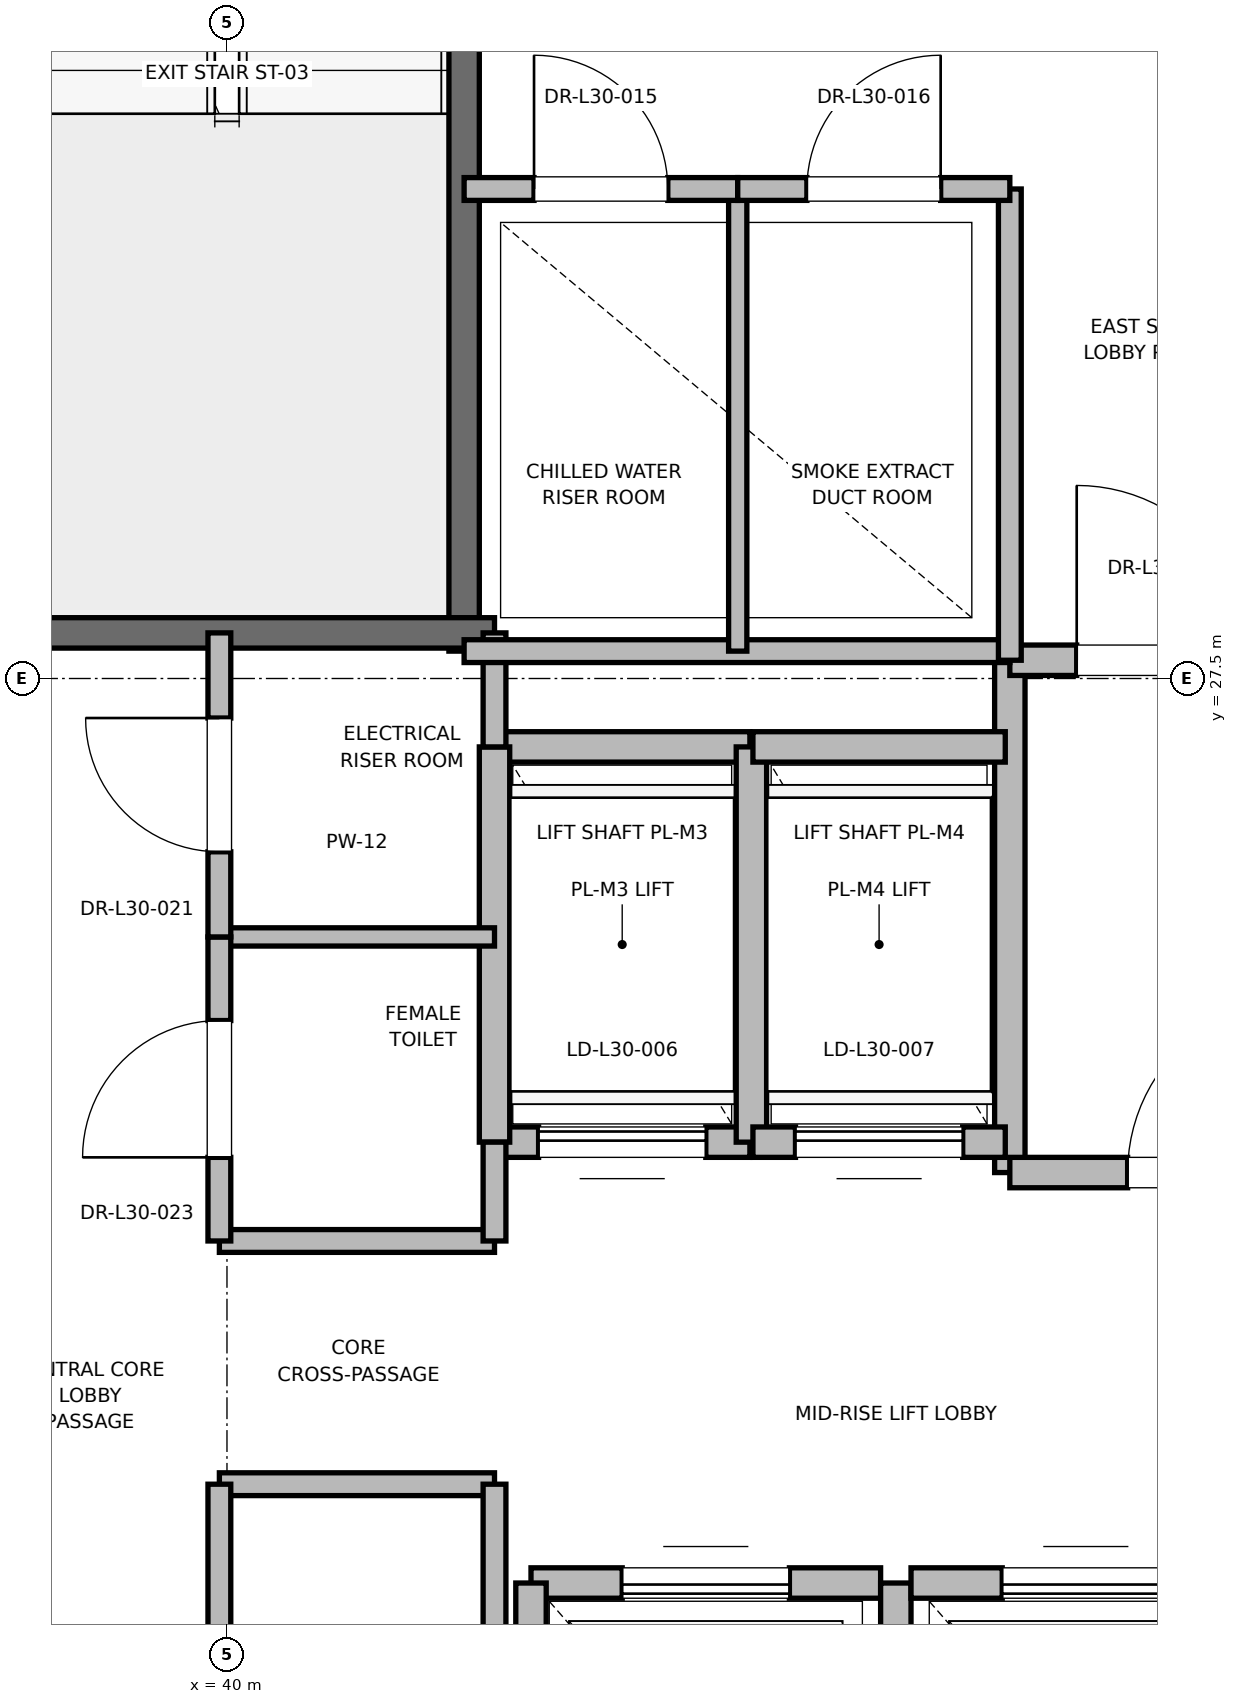
"""IFC4 building model, lengths in metres.
Left out: names, types, materials, properties, quantities, classifications, styles, units other than length and angle.
Written with IfcOpenShell. Run it as: python <this file> out.ifc"""

import sys

from ifc_helpers import new_model, si_unit, direction, frame, frame_2d, origin, place, context, subcontext, project, spatial, rectangle, extrude, element, fill, save


model = new_model("IFC4")
c1 = context("Model", 3, precision=1e-05, world=origin(), true_north=direction((0.0, 1.0)))
c2 = subcontext(c1, "Body", "Model", "MODEL_VIEW")
j1 = project(units=[si_unit("LENGTHUNIT", "METRE"), si_unit("PLANEANGLEUNIT", "RADIAN")], contexts=[c1])
p1 = place(None, origin())
s1 = spatial("IfcSite", under=j1, at=p1, CompositionType="ELEMENT")
p2 = place(p1, origin())
s2 = spatial("IfcBuilding", under=s1, at=p2, CompositionType="ELEMENT")
p3 = place(p2, frame((0.0, 0.0, 132.4)))
s3 = spatial("IfcBuildingStorey", under=s2, at=p3, CompositionType="ELEMENT", Elevation=132.4)
p4 = place(p3, frame((41.56, 27.68, 0.0), z_axis=(0.0, 0.0, 1.0), x_axis=(0.0, 1.0, 0.0)))
e1 = element("IfcWall", 1, at=p4, inside=s3, PredefinedType="SOLIDWALL", context=c2, shape_type="SweptSolid", body=[
    extrude(rectangle(XDim=8.57, YDim=0.2, at=frame_2d((4.285, 0.0))), origin(), (0.0, 0.0, 1.0), 3.775),
])
p5 = place(p3, frame((38.44, 27.8, 0.0), z_axis=(0.0, 0.0, 1.0), x_axis=(1.0, 0.0, 0.0)))
e2 = element("IfcWall", 2, at=p5, inside=s3, PredefinedType="SOLIDWALL", context=c2, shape_type="SweptSolid", body=[
    extrude(rectangle(XDim=3.32, YDim=0.2, at=frame_2d((1.66, 0.0))), origin(), (0.0, 0.0, 1.0), 3.775),
])
p6 = place(p3, frame((45.15, 24.25, 0.0), z_axis=(0.0, 0.0, 1.0), x_axis=(0.0, 1.0, 0.0)))
e3 = element("IfcWall", 3, at=p6, inside=s3, PredefinedType="PARTITIONING", context=c2, shape_type="SweptSolid", body=[
    extrude(rectangle(XDim=3.37, YDim=0.2, at=frame_2d((1.685, 0.0))), origin(), (0.0, 0.0, 1.0), 3.775),
])
p7 = place(p3, frame((45.15, 24.25, 0.0), z_axis=(0.0, 0.0, 1.0), x_axis=(1.0, 0.0, 0.0)))
e4 = element("IfcWall", 4, at=p7, inside=s3, PredefinedType="PARTITIONING", context=c2, shape_type="SweptSolid", body=[
    extrude(rectangle(XDim=2.7, YDim=0.2, at=frame_2d((1.35, 0.0))), origin(), (0.0, 0.0, 1.0), 3.775),
])
p8 = place(p7, frame((0.775, 0.0, 0.0)))
e5 = element("IfcOpeningElement", 5, at=p8, cuts=e4, PredefinedType="OPENING", context=c2, shape_type="SweptSolid", body=[
    extrude(rectangle(XDim=1.15, YDim=2.2, at=frame_2d((0.575, 1.1))), frame((0.0, 0.1, 0.0), z_axis=(0.0, -1.0, 0.0), x_axis=(1.0, 0.0, 0.0)), (0.0, 0.0, 1.0), 0.2),
])
p9 = place(p3, frame((45.15, 27.62, 0.0), z_axis=(0.0, 0.0, 1.0), x_axis=(1.0, 0.0, 0.0)))
e6 = element("IfcWall", 6, at=p9, inside=s3, PredefinedType="PARTITIONING", context=c2, shape_type="SweptSolid", body=[
    extrude(rectangle(XDim=2.03, YDim=0.2, at=frame_2d((1.015, 0.0))), origin(), (0.0, 0.0, 1.0), 3.775),
])
p10 = place(p9, frame((0.44, 0.0, 0.0)))
e7 = element("IfcOpeningElement", 7, at=p10, cuts=e6, PredefinedType="OPENING", context=c2, shape_type="SweptSolid", body=[
    extrude(rectangle(XDim=1.15, YDim=2.2, at=frame_2d((0.575, 1.1))), frame((0.0, 0.1, 0.0), z_axis=(0.0, -1.0, 0.0), x_axis=(1.0, 0.0, 0.0)), (0.0, 0.0, 1.0), 0.2),
])
p11 = place(p3, frame((44.3, 21.55, 0.0), z_axis=(0.0, 0.0, 1.0), x_axis=(-1.0, 0.0, 0.0)))
e8 = element("IfcWall", 8, at=p11, inside=s3, PredefinedType="SOLIDWALL", context=c2, shape_type="SweptSolid", body=[
    extrude(rectangle(XDim=2.3, YDim=0.2, at=frame_2d((1.15, 0.0))), origin(), (0.0, 0.0, 1.0), 3.775),
])
p12 = place(p11, frame((0.6, 0.0, 0.0)))
e9 = element("IfcOpeningElement", 9, at=p12, cuts=e8, PredefinedType="OPENING", context=c2, shape_type="SweptSolid", body=[
    extrude(rectangle(XDim=1.1, YDim=2.2, at=frame_2d((0.55, 1.1))), frame((0.0, 0.1, 0.0), z_axis=(0.0, -1.0, 0.0), x_axis=(1.0, 0.0, 0.0)), (0.0, 0.0, 1.0), 0.2),
])
p13 = place(p3, frame((42.0, 21.55, 0.0), z_axis=(0.0, 0.0, 1.0), x_axis=(0.0, -1.0, 0.0)))
e10 = element("IfcWall", 10, at=p13, inside=s3, PredefinedType="SOLIDWALL", context=c2, shape_type="SweptSolid", body=[
    extrude(rectangle(XDim=2.6, YDim=0.2, at=frame_2d((1.3, 0.0))), origin(), (0.0, 0.0, 1.0), 2.755),
])
p14 = place(p3, frame((44.4, 18.95, 0.0), z_axis=(0.0, 0.0, 1.0), x_axis=(0.0, 1.0, 0.0)))
e11 = element("IfcWall", 11, at=p14, inside=s3, PredefinedType="SOLIDWALL", context=c2, shape_type="SweptSolid", body=[
    extrude(rectangle(XDim=2.6, YDim=0.2, at=frame_2d((1.3, 0.0))), origin(), (0.0, 0.0, 1.0), 3.775),
])
p15 = place(p3, frame((46.8, 21.55, 0.0), z_axis=(0.0, 0.0, 1.0), x_axis=(-1.0, 0.0, 0.0)))
e12 = element("IfcWall", 12, at=p15, inside=s3, PredefinedType="SOLIDWALL", context=c2, shape_type="SweptSolid", body=[
    extrude(rectangle(XDim=2.3, YDim=0.2, at=frame_2d((1.15, 0.0))), origin(), (0.0, 0.0, 1.0), 3.775),
])
p16 = place(p15, frame((0.6, 0.0, 0.0)))
e13 = element("IfcOpeningElement", 13, at=p16, cuts=e12, PredefinedType="OPENING", context=c2, shape_type="SweptSolid", body=[
    extrude(rectangle(XDim=1.1, YDim=2.2, at=frame_2d((0.55, 1.1))), frame((0.0, 0.1, 0.0), z_axis=(0.0, -1.0, 0.0), x_axis=(1.0, 0.0, 0.0)), (0.0, 0.0, 1.0), 0.2),
])
p17 = place(p3, frame((41.76, 24.45, 0.0), z_axis=(0.0, 0.0, 1.0), x_axis=(1.0, 0.0, 0.0)))
e14 = element("IfcWall", 14, at=p17, inside=s3, PredefinedType="SOLIDWALL", context=c2, shape_type="SweptSolid", body=[
    extrude(rectangle(XDim=1.68, YDim=0.2, at=frame_2d((0.84, 0.0))), origin(), (0.0, 0.0, 1.0), 3.775),
])
p18 = place(p17, frame((0.29, 0.0, 0.0)))
e15 = element("IfcOpeningElement", 15, at=p18, cuts=e14, PredefinedType="OPENING", context=c2, shape_type="SweptSolid", body=[
    extrude(rectangle(XDim=1.1, YDim=2.2, at=frame_2d((0.55, 1.1))), frame((0.0, 0.1, 0.0), z_axis=(0.0, -1.0, 0.0), x_axis=(1.0, 0.0, 0.0)), (0.0, 0.0, 1.0), 0.2),
])
p19 = place(p3, frame((43.44, 27.05, 0.0), z_axis=(0.0, 0.0, 1.0), x_axis=(-1.0, 0.0, 0.0)))
e16 = element("IfcWall", 16, at=p19, inside=s3, PredefinedType="SOLIDWALL", context=c2, shape_type="SweptSolid", body=[
    extrude(rectangle(XDim=1.68, YDim=0.2, at=frame_2d((0.84, 0.0))), origin(), (0.0, 0.0, 1.0), 3.775),
])
for number, where, z_axis, x_axis in (
    (17, (41.76, 27.05, 0.0), (0.0, 0.0, 1.0), (0.0, -1.0, 0.0)),
    (18, (43.45, 24.45, 0.0), (0.0, 0.0, 1.0), (0.0, 1.0, 0.0)),
):
    element("IfcWall", number, at=place(p3, frame(where, z_axis=z_axis, x_axis=x_axis)), inside=s3, PredefinedType="SOLIDWALL", context=c2, shape_type="SweptSolid", body=[
        extrude(rectangle(XDim=2.6, YDim=0.2, at=frame_2d((1.3, 0.0))), origin(), (0.0, 0.0, 1.0), 3.775),
    ])
p20 = place(p3, frame((43.46, 24.45, 0.0), z_axis=(0.0, 0.0, 1.0), x_axis=(1.0, 0.0, 0.0)))
e19 = element("IfcWall", 19, at=p20, inside=s3, PredefinedType="SOLIDWALL", context=c2, shape_type="SweptSolid", body=[
    extrude(rectangle(XDim=1.66, YDim=0.2, at=frame_2d((0.83, 0.0))), origin(), (0.0, 0.0, 1.0), 3.775),
])
p21 = place(p20, frame((0.28, 0.0, 0.0)))
e20 = element("IfcOpeningElement", 20, at=p21, cuts=e19, PredefinedType="OPENING", context=c2, shape_type="SweptSolid", body=[
    extrude(rectangle(XDim=1.1, YDim=2.2, at=frame_2d((0.55, 1.1))), frame((0.0, 0.1, 0.0), z_axis=(0.0, -1.0, 0.0), x_axis=(1.0, 0.0, 0.0)), (0.0, 0.0, 1.0), 0.2),
])
p22 = place(p3, frame((45.12, 27.05, 0.0), z_axis=(0.0, 0.0, 1.0), x_axis=(-1.0, 0.0, 0.0)))
e21 = element("IfcWall", 21, at=p22, inside=s3, PredefinedType="SOLIDWALL", context=c2, shape_type="SweptSolid", body=[
    extrude(rectangle(XDim=1.66, YDim=0.2, at=frame_2d((0.83, 0.0))), origin(), (0.0, 0.0, 1.0), 3.775),
])
for number, where, z_axis, x_axis in (
    (22, (39.95, 22.2, 0.0), (0.0, 0.0, 1.0), (1.0, 0.0, 0.0)),
    (23, (39.95, 23.8, 0.0), (0.0, 0.0, 1.0), (1.0, 0.0, 0.0)),
):
    element("IfcWall", number, at=place(p3, frame(where, z_axis=z_axis, x_axis=x_axis)), inside=s3, PredefinedType="PARTITIONING", context=c2, shape_type="SweptSolid", body=[
        extrude(rectangle(XDim=1.81, YDim=0.15, at=frame_2d((0.905, 0.0))), origin(), (0.0, 0.0, 1.0), 2.85),
    ])
p23 = place(p3, frame((39.95, 25.8, 0.0), z_axis=(0.0, 0.0, 1.0), x_axis=(1.0, 0.0, 0.0)))
e24 = element("IfcWall", 24, at=p23, inside=s3, PredefinedType="PARTITIONING", context=c2, shape_type="SweptSolid", body=[
    extrude(rectangle(XDim=1.81, YDim=0.12, at=frame_2d((0.905, 0.0))), origin(), (0.0, 0.0, 1.0), 2.85),
])
p24 = place(p3, frame((41.76, 18.6, 0.0), z_axis=(0.0, 0.0, 1.0), x_axis=(0.0, 1.0, 0.0)))
e25 = element("IfcWall", 25, at=p24, inside=s3, PredefinedType="PARTITIONING", context=c2, shape_type="SweptSolid", body=[
    extrude(rectangle(XDim=3.6, YDim=0.15, at=frame_2d((1.8, 0.0))), origin(), (0.0, 0.0, 1.0), 2.755),
])
p25 = place(p3, frame((41.76, 23.8, 0.0), z_axis=(0.0, 0.0, 1.0), x_axis=(0.0, 1.0, 0.0)))
e26 = element("IfcWall", 26, at=p25, inside=s3, PredefinedType="PARTITIONING", context=c2, shape_type="SweptSolid", body=[
    extrude(rectangle(XDim=0.65, YDim=0.15, at=frame_2d((0.325, 0.0))), origin(), (0.0, 0.0, 1.0), 2.85),
])
p26 = place(p3, frame((41.76, 27.05, 0.0), z_axis=(0.0, 0.0, 1.0), x_axis=(0.0, 1.0, 0.0)))
e27 = element("IfcWall", 27, at=p26, inside=s3, PredefinedType="PARTITIONING", context=c2, shape_type="SweptSolid", body=[
    extrude(rectangle(XDim=0.75, YDim=0.15, at=frame_2d((0.375, 0.0))), origin(), (0.0, 0.0, 1.0), 2.85),
])
p27 = place(p3, frame((39.95, 19.2, 0.0), z_axis=(0.0, 0.0, 1.0), x_axis=(0.0, 1.0, 0.0)))
e28 = element("IfcWall", 28, at=p27, inside=s3, PredefinedType="PARTITIONING", context=c2, shape_type="SweptSolid", body=[
    extrude(rectangle(XDim=3.0, YDim=0.15, at=frame_2d((1.5, 0.0))), origin(), (0.0, 0.0, 1.0), 2.85),
])
p28 = place(p27, frame((1.05, 0.0, 0.0)))
e29 = element("IfcOpeningElement", 29, at=p28, cuts=e28, PredefinedType="OPENING", context=c2, shape_type="SweptSolid", body=[
    extrude(rectangle(XDim=0.9, YDim=2.1, at=frame_2d((0.45, 1.05))), frame((0.0, 0.075, 0.0), z_axis=(0.0, -1.0, 0.0), x_axis=(1.0, 0.0, 0.0)), (0.0, 0.0, 1.0), 0.15),
])
p29 = place(p3, frame((39.95, 23.8, 0.0), z_axis=(0.0, 0.0, 1.0), x_axis=(0.0, 1.0, 0.0)))
e30 = element("IfcWall", 30, at=p29, inside=s3, PredefinedType="PARTITIONING", context=c2, shape_type="SweptSolid", body=[
    extrude(rectangle(XDim=2.0, YDim=0.15, at=frame_2d((1.0, 0.0))), origin(), (0.0, 0.0, 1.0), 2.85),
])
p30 = place(p29, frame((0.55, 0.0, 0.0)))
e31 = element("IfcOpeningElement", 31, at=p30, cuts=e30, PredefinedType="OPENING", context=c2, shape_type="SweptSolid", body=[
    extrude(rectangle(XDim=0.9, YDim=2.1, at=frame_2d((0.45, 1.05))), frame((0.0, 0.075, 0.0), z_axis=(0.0, -1.0, 0.0), x_axis=(1.0, 0.0, 0.0)), (0.0, 0.0, 1.0), 0.15),
])
p31 = place(p3, frame((39.95, 25.8, 0.0), z_axis=(0.0, 0.0, 1.0), x_axis=(0.0, 1.0, 0.0)))
e32 = element("IfcWall", 32, at=p31, inside=s3, PredefinedType="PARTITIONING", context=c2, shape_type="SweptSolid", body=[
    extrude(rectangle(XDim=2.0, YDim=0.15, at=frame_2d((1.0, 0.0))), origin(), (0.0, 0.0, 1.0), 2.85),
])
p32 = place(p31, frame((0.56, 0.0, 0.0)))
e33 = element("IfcOpeningElement", 33, at=p32, cuts=e32, PredefinedType="OPENING", context=c2, shape_type="SweptSolid", body=[
    extrude(rectangle(XDim=0.88, YDim=2.1, at=frame_2d((0.44, 1.05))), frame((0.0, 0.075, 0.0), z_axis=(0.0, -1.0, 0.0), x_axis=(1.0, 0.0, 0.0)), (0.0, 0.0, 1.0), 0.15),
])
p33 = place(p3, frame((41.56, 27.68, 0.0), z_axis=(0.0, 0.0, 1.0), x_axis=(1.0, 0.0, 0.0)))
e34 = element("IfcWall", 34, at=p33, inside=s3, PredefinedType="PARTITIONING", context=c2, shape_type="SweptSolid", body=[
    extrude(rectangle(XDim=3.59, YDim=0.15, at=frame_2d((1.795, 0.0))), origin(), (0.0, 0.0, 1.0), 2.85),
])
p34 = place(p3, frame((45.15, 27.62, 0.0), z_axis=(0.0, 0.0, 1.0), x_axis=(0.0, 1.0, 0.0)))
e35 = element("IfcWall", 35, at=p34, inside=s3, PredefinedType="PARTITIONING", context=c2, shape_type="SweptSolid", body=[
    extrude(rectangle(XDim=3.1, YDim=0.15, at=frame_2d((1.55, 0.0))), origin(), (0.0, 0.0, 1.0), 2.85),
])
p35 = place(p3, frame((43.36, 27.68, 0.0), z_axis=(0.0, 0.0, 1.0), x_axis=(0.0, 1.0, 0.0)))
e36 = element("IfcWall", 36, at=p35, inside=s3, PredefinedType="PARTITIONING", context=c2, shape_type="SweptSolid", body=[
    extrude(rectangle(XDim=3.04, YDim=0.12, at=frame_2d((1.52, 0.0))), origin(), (0.0, 0.0, 1.0), 2.85),
])
p36 = place(p3, frame((41.56, 30.72, 0.0), z_axis=(0.0, 0.0, 1.0), x_axis=(1.0, 0.0, 0.0)))
e37 = element("IfcWall", 37, at=p36, inside=s3, PredefinedType="PARTITIONING", context=c2, shape_type="SweptSolid", body=[
    extrude(rectangle(XDim=1.8, YDim=0.15, at=frame_2d((0.9, 0.0))), origin(), (0.0, 0.0, 1.0), 2.85),
])
p37 = place(p36, frame((0.46, 0.0, 0.0)))
e38 = element("IfcOpeningElement", 38, at=p37, cuts=e37, PredefinedType="OPENING", context=c2, shape_type="SweptSolid", body=[
    extrude(rectangle(XDim=0.88, YDim=2.1, at=frame_2d((0.44, 1.05))), frame((0.0, 0.075, 0.0), z_axis=(0.0, -1.0, 0.0), x_axis=(1.0, 0.0, 0.0)), (0.0, 0.0, 1.0), 0.15),
])
p38 = place(p3, frame((43.36, 30.72, 0.0), z_axis=(0.0, 0.0, 1.0), x_axis=(1.0, 0.0, 0.0)))
e39 = element("IfcWall", 39, at=p38, inside=s3, PredefinedType="PARTITIONING", context=c2, shape_type="SweptSolid", body=[
    extrude(rectangle(XDim=1.79, YDim=0.15, at=frame_2d((0.895, 0.0))), origin(), (0.0, 0.0, 1.0), 2.85),
])
p39 = place(p38, frame((0.455, 0.0, 0.0)))
e40 = element("IfcOpeningElement", 40, at=p39, cuts=e39, PredefinedType="OPENING", context=c2, shape_type="SweptSolid", body=[
    extrude(rectangle(XDim=0.88, YDim=2.1, at=frame_2d((0.44, 1.05))), frame((0.0, 0.075, 0.0), z_axis=(0.0, -1.0, 0.0), x_axis=(1.0, 0.0, 0.0)), (0.0, 0.0, 1.0), 0.15),
])
p40 = place(p8, origin())
e41 = element("IfcDoor", 41, at=p40, inside=s3, OperationType="SINGLE_SWING_RIGHT", PredefinedType="DOOR", context=c2, shape_type="SweptSolid", body=[
    extrude(rectangle(XDim=1.15, YDim=2.2, at=frame_2d((0.575, 1.1))), frame((0.0, 0.025, 0.0), z_axis=(0.0, -1.0, 0.0), x_axis=(1.0, 0.0, 0.0)), (0.0, 0.0, 1.0), 0.05),
])
fill(e5, e41)
p41 = place(p10, origin())
e42 = element("IfcDoor", 42, at=p41, inside=s3, OperationType="SINGLE_SWING_LEFT", PredefinedType="DOOR", context=c2, shape_type="SweptSolid", body=[
    extrude(rectangle(XDim=1.15, YDim=2.2, at=frame_2d((0.575, 1.1))), frame((0.0, 0.025, 0.0), z_axis=(0.0, -1.0, 0.0), x_axis=(1.0, 0.0, 0.0)), (0.0, 0.0, 1.0), 0.05),
])
fill(e7, e42)
p42 = place(p12, origin())
e43 = element("IfcDoor", 43, at=p42, inside=s3, OperationType="SLIDING_TO_RIGHT", PredefinedType="DOOR", context=c2, shape_type="SweptSolid", body=[
    extrude(rectangle(XDim=1.1, YDim=2.2, at=frame_2d((0.55, 1.1))), frame((0.0, 0.025, 0.0), z_axis=(0.0, -1.0, 0.0), x_axis=(1.0, 0.0, 0.0)), (0.0, 0.0, 1.0), 0.05),
])
fill(e9, e43)
p43 = place(p16, origin())
e44 = element("IfcDoor", 44, at=p43, inside=s3, OperationType="SLIDING_TO_RIGHT", PredefinedType="DOOR", context=c2, shape_type="SweptSolid", body=[
    extrude(rectangle(XDim=1.1, YDim=2.2, at=frame_2d((0.55, 1.1))), frame((0.0, 0.025, 0.0), z_axis=(0.0, -1.0, 0.0), x_axis=(1.0, 0.0, 0.0)), (0.0, 0.0, 1.0), 0.05),
])
fill(e13, e44)
p44 = place(p18, origin())
e45 = element("IfcDoor", 45, at=p44, inside=s3, OperationType="SLIDING_TO_RIGHT", PredefinedType="DOOR", context=c2, shape_type="SweptSolid", body=[
    extrude(rectangle(XDim=1.1, YDim=2.2, at=frame_2d((0.55, 1.1))), frame((0.0, 0.025, 0.0), z_axis=(0.0, -1.0, 0.0), x_axis=(1.0, 0.0, 0.0)), (0.0, 0.0, 1.0), 0.05),
])
fill(e15, e45)
p45 = place(p21, origin())
e46 = element("IfcDoor", 46, at=p45, inside=s3, OperationType="SLIDING_TO_RIGHT", PredefinedType="DOOR", context=c2, shape_type="SweptSolid", body=[
    extrude(rectangle(XDim=1.1, YDim=2.2, at=frame_2d((0.55, 1.1))), frame((0.0, 0.025, 0.0), z_axis=(0.0, -1.0, 0.0), x_axis=(1.0, 0.0, 0.0)), (0.0, 0.0, 1.0), 0.05),
])
fill(e20, e46)
p46 = place(p30, origin())
e47 = element("IfcDoor", 47, at=p46, inside=s3, OperationType="SINGLE_SWING_LEFT", PredefinedType="DOOR", context=c2, shape_type="SweptSolid", body=[
    extrude(rectangle(XDim=0.9, YDim=2.1, at=frame_2d((0.45, 1.05))), frame((0.0, 0.025, 0.0), z_axis=(0.0, -1.0, 0.0), x_axis=(1.0, 0.0, 0.0)), (0.0, 0.0, 1.0), 0.05),
])
fill(e31, e47)
p47 = place(p32, origin())
e48 = element("IfcDoor", 48, at=p47, inside=s3, OperationType="SINGLE_SWING_RIGHT", PredefinedType="DOOR", context=c2, shape_type="SweptSolid", body=[
    extrude(rectangle(XDim=0.88, YDim=2.1, at=frame_2d((0.44, 1.05))), frame((0.0, 0.025, 0.0), z_axis=(0.0, -1.0, 0.0), x_axis=(1.0, 0.0, 0.0)), (0.0, 0.0, 1.0), 0.05),
])
fill(e33, e48)
p48 = place(p37, origin())
e49 = element("IfcDoor", 49, at=p48, inside=s3, OperationType="SINGLE_SWING_LEFT", PredefinedType="DOOR", context=c2, shape_type="SweptSolid", body=[
    extrude(rectangle(XDim=0.88, YDim=2.1, at=frame_2d((0.44, 1.05))), frame((0.0, 0.025, 0.0), z_axis=(0.0, -1.0, 0.0), x_axis=(1.0, 0.0, 0.0)), (0.0, 0.0, 1.0), 0.05),
])
fill(e38, e49)
p49 = place(p39, origin())
e50 = element("IfcDoor", 50, at=p49, inside=s3, OperationType="SINGLE_SWING_RIGHT", PredefinedType="DOOR", context=c2, shape_type="SweptSolid", body=[
    extrude(rectangle(XDim=0.88, YDim=2.1, at=frame_2d((0.44, 1.05))), frame((0.0, 0.025, 0.0), z_axis=(0.0, -1.0, 0.0), x_axis=(1.0, 0.0, 0.0)), (0.0, 0.0, 1.0), 0.05),
])
fill(e40, e50)
save(model, sys.argv[1])
